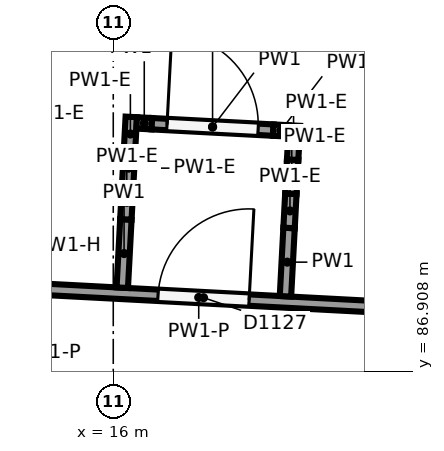
"""IFC4 building model, lengths in metres.
Left out: names, types, materials, properties, quantities, classifications, styles, units other than length and angle.
Written with IfcOpenShell. Run it as: python <this file> out.ifc"""

import sys

from ifc_helpers import new_model, si_unit, direction, frame, frame_2d, origin, place, context, subcontext, project, spatial, rectangle, extrude, element, fill, save


model = new_model("IFC4")
c1 = context("Model", 3, precision=1e-05, world=origin(), true_north=direction((0.0, 1.0)))
c2 = subcontext(c1, "Body", "Model", "MODEL_VIEW")
j1 = project(units=[si_unit("LENGTHUNIT", "METRE"), si_unit("PLANEANGLEUNIT", "RADIAN")], contexts=[c1])
p1 = place(None, origin())
s1 = spatial("IfcSite", under=j1, at=p1, CompositionType="ELEMENT")
p2 = place(p1, origin())
s2 = spatial("IfcBuilding", under=s1, at=p2, CompositionType="ELEMENT")
p3 = place(p2, frame((0.0, 0.0, 12.0)))
s3 = spatial("IfcBuildingStorey", under=s2, at=p3, CompositionType="ELEMENT", Elevation=12.0)
p4 = place(p3, frame((14.642, 88.012, 0.0), z_axis=(0.0, 0.0, 1.0), x_axis=(0.998613893233, -0.052633565738, 0.0)))
e1 = element("IfcWall", 1, at=p4, inside=s3, PredefinedType="PARTITIONING", context=c2, shape_type="SweptSolid", body=[
    extrude(rectangle(XDim=4.972, YDim=0.15, at=frame_2d((2.486, 0.0))), origin(), (0.0, 0.0, 1.0), 3.907),
])
p5 = place(p4, frame((1.95, 0.0, 0.0)))
e2 = element("IfcOpeningElement", 2, at=p5, cuts=e1, PredefinedType="OPENING", context=c2, shape_type="SweptSolid", body=[
    extrude(rectangle(XDim=1.2, YDim=2.1, at=frame_2d((0.6, 1.05))), frame((0.0, 0.085, 0.0), z_axis=(0.0, -1.0, 0.0), x_axis=(1.0, 0.0, 0.0)), (0.0, 0.0, 1.0), 0.17),
])
p6 = place(p3, frame((16.119, 88.009, 0.0), z_axis=(0.0, 0.0, 1.0), x_axis=(0.052630027564, 0.998614079712, 0.0)))
e3 = element("IfcWall", 3, at=p6, inside=s3, PredefinedType="PARTITIONING", context=c2, shape_type="SweptSolid", body=[
    extrude(rectangle(XDim=0.9, YDim=0.15, at=frame_2d((0.45, 0.0))), origin(), (0.0, 0.0, 1.0), 5.65),
])
p7 = place(p3, frame((16.166, 88.908, 0.0), z_axis=(0.0, 0.0, 1.0), x_axis=(0.052615773272, 0.998614830855, 0.0)))
e4 = element("IfcWall", 4, at=p7, inside=s3, PredefinedType="PARTITIONING", context=c2, shape_type="SweptSolid", body=[
    extrude(rectangle(XDim=0.45, YDim=0.15, at=frame_2d((0.225, 0.0))), origin(), (0.0, 0.0, 1.0), 4.35),
])
p8 = place(p3, frame((16.19, 89.357, 0.0), z_axis=(0.0, 0.0, 1.0), x_axis=(0.052644289572, 0.998613327958, 0.0)))
e5 = element("IfcWall", 5, at=p8, inside=s3, PredefinedType="PARTITIONING", context=c2, shape_type="SweptSolid", body=[
    extrude(rectangle(XDim=0.45, YDim=0.15, at=frame_2d((0.225, 0.0))), origin(), (0.0, 0.0, 1.0), 4.35),
])
p9 = place(p3, frame((16.213, 89.806, 0.0), z_axis=(0.0, 0.0, 1.0), x_axis=(0.052615773272, 0.998614830855, 0.0)))
e6 = element("IfcWall", 6, at=p9, inside=s3, PredefinedType="PARTITIONING", context=c2, shape_type="SweptSolid", body=[
    extrude(rectangle(XDim=0.45, YDim=0.15, at=frame_2d((0.225, 0.0))), origin(), (0.0, 0.0, 1.0), 4.35),
])
p10 = place(p3, frame((18.266, 87.896, 0.0), z_axis=(0.0, 0.0, 1.0), x_axis=(0.052615773272, 0.998614830855, 0.0)))
e7 = element("IfcWall", 7, at=p10, inside=s3, PredefinedType="PARTITIONING", context=c2, shape_type="SweptSolid", body=[
    extrude(rectangle(XDim=0.9, YDim=0.15, at=frame_2d((0.45, 0.0))), origin(), (0.0, 0.0, 1.0), 5.65),
])
p11 = place(p3, frame((18.313, 88.795, 0.0), z_axis=(0.0, 0.0, 1.0), x_axis=(0.052644289572, 0.998613327958, 0.0)))
e8 = element("IfcWall", 8, at=p11, inside=s3, PredefinedType="PARTITIONING", context=c2, shape_type="SweptSolid", body=[
    extrude(rectangle(XDim=0.45, YDim=0.15, at=frame_2d((0.225, 0.0))), origin(), (0.0, 0.0, 1.0), 4.35),
])
p12 = place(p3, frame((18.337, 89.244, 0.0), z_axis=(0.0, 0.0, 1.0), x_axis=(0.052615773272, 0.998614830855, 0.0)))
e9 = element("IfcWall", 9, at=p12, inside=s3, PredefinedType="PARTITIONING", context=c2, shape_type="SweptSolid", body=[
    extrude(rectangle(XDim=0.45, YDim=0.15, at=frame_2d((0.225, 0.0))), origin(), (0.0, 0.0, 1.0), 4.35),
])
p13 = place(p3, frame((18.36, 89.693, 0.0), z_axis=(0.0, 0.0, 1.0), x_axis=(0.052644289572, 0.998613327958, 0.0)))
e10 = element("IfcWall", 10, at=p13, inside=s3, PredefinedType="PARTITIONING", context=c2, shape_type="SweptSolid", body=[
    extrude(rectangle(XDim=0.45, YDim=0.15, at=frame_2d((0.225, 0.0))), origin(), (0.0, 0.0, 1.0), 4.35),
])
p14 = place(p3, frame((16.308, 90.177, 0.0), z_axis=(0.0, 0.0, 1.0), x_axis=(0.998621199675, -0.05249475744, 0.0)))
e11 = element("IfcWall", 11, at=p14, inside=s3, PredefinedType="PARTITIONING", context=c2, shape_type="SweptSolid", body=[
    extrude(rectangle(XDim=0.2, YDim=0.15, at=frame_2d((0.1, 0.0))), origin(), (0.0, 0.0, 1.0), 5.65),
])
p15 = place(p3, frame((16.508, 90.167, 0.0), z_axis=(0.0, 0.0, 1.0), x_axis=(0.998613188435, -0.052646936126, 0.0)))
e12 = element("IfcWall", 12, at=p15, inside=s3, PredefinedType="PARTITIONING", context=c2, shape_type="SweptSolid", body=[
    extrude(rectangle(XDim=1.6, YDim=0.15, at=frame_2d((0.8, 0.0))), origin(), (0.0, 0.0, 1.0), 5.65),
])
p16 = place(p15, frame((0.2, 0.0, 0.0)))
e13 = element("IfcOpeningElement", 13, at=p16, cuts=e12, PredefinedType="OPENING", context=c2, shape_type="SweptSolid", body=[
    extrude(rectangle(XDim=1.2, YDim=2.1, at=frame_2d((0.6, 1.05))), frame((0.0, 0.085, 0.0), z_axis=(0.0, -1.0, 0.0), x_axis=(1.0, 0.0, 0.0)), (0.0, 0.0, 1.0), 0.17),
])
p17 = place(p3, frame((18.105, 90.082, 0.0), z_axis=(0.0, 0.0, 1.0), x_axis=(0.998621199675, -0.05249475744, 0.0)))
e14 = element("IfcWall", 14, at=p17, inside=s3, PredefinedType="PARTITIONING", context=c2, shape_type="SweptSolid", body=[
    extrude(rectangle(XDim=0.2, YDim=0.15, at=frame_2d((0.1, 0.0))), origin(), (0.0, 0.0, 1.0), 5.65),
])
p18 = place(p5, origin())
e15 = element("IfcDoor", 15, at=p18, inside=s3, OperationType="SINGLE_SWING_RIGHT", PredefinedType="DOOR", context=c2, shape_type="SweptSolid", body=[
    extrude(rectangle(XDim=1.2, YDim=2.1, at=frame_2d((0.6, 1.05))), frame((0.0, 0.025, 0.0), z_axis=(0.0, -1.0, 0.0), x_axis=(1.0, 0.0, 0.0)), (0.0, 0.0, 1.0), 0.05),
])
fill(e2, e15)
p19 = place(p16, origin())
e16 = element("IfcDoor", 16, at=p19, inside=s3, OperationType="SINGLE_SWING_LEFT", PredefinedType="DOOR", context=c2, shape_type="SweptSolid", body=[
    extrude(rectangle(XDim=1.2, YDim=2.1, at=frame_2d((0.6, 1.05))), frame((0.0, 0.025, 0.0), z_axis=(0.0, -1.0, 0.0), x_axis=(1.0, 0.0, 0.0)), (0.0, 0.0, 1.0), 0.05),
])
fill(e13, e16)
save(model, sys.argv[1])
